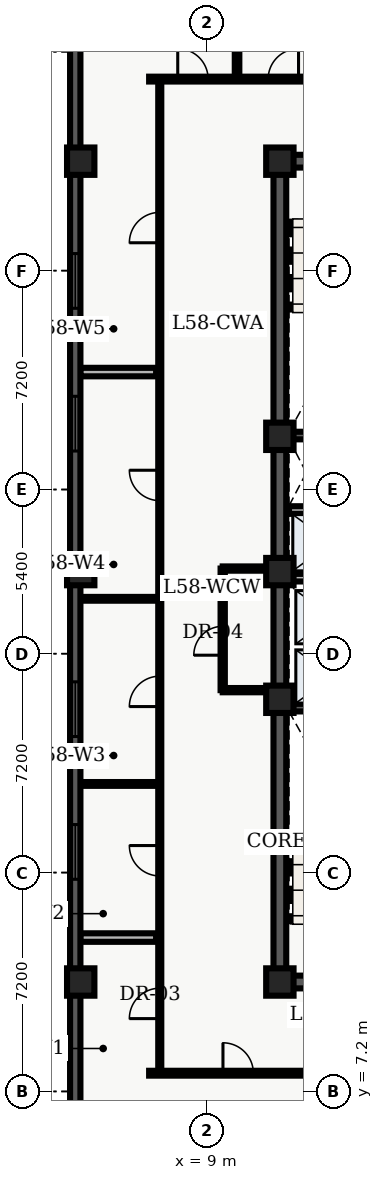
"""IFC4 building model, lengths in metres.
Left out: names, types, materials, properties, quantities, classifications, styles, units other than length and angle.
Written with IfcOpenShell. Run it as: python <this file> out.ifc"""

import sys

from ifc_helpers import new_model, entity, si_unit, converted_unit, direction, frame, origin_with_axes, origin_2d_with_axis, place, context, subcontext, project, spatial, polyline, rectangle, outline, extrude, element, fill, save


model = new_model("IFC4")
c1 = context("Model", 3, precision=1e-05, world=origin_with_axes(), true_north=direction((0.0, 1.0)))
c2 = subcontext(c1, "Body", "Model", "MODEL_VIEW")
j1 = project(units=[si_unit("LENGTHUNIT", "METRE"), converted_unit("PLANEANGLEUNIT", "DEGREE", entity("IfcPlaneAngleMeasure", 0.017), si_unit("PLANEANGLEUNIT", "RADIAN"), dimensions=[0, 0, 0, 0, 0, 0, 0])], contexts=[c1])
p1 = place(None, origin_with_axes())
s1 = spatial("IfcSite", under=j1, at=p1, CompositionType="ELEMENT")
p2 = place(p1, origin_with_axes())
s2 = spatial("IfcBuilding", under=s1, at=p2, CompositionType="ELEMENT")
p3 = place(p2, frame((0.0, 0.0, 236.4), z_axis=(0.0, 0.0, 1.0), x_axis=(1.0, 0.0, 0.0)))
s3 = spatial("IfcBuildingStorey", under=s2, at=p3, CompositionType="ELEMENT", Elevation=236.4)
p4 = place(p3, frame((11.4, 10.8, 0.0), z_axis=(0.0, 0.0, 1.0), x_axis=(0.0, 1.0, 0.0)))
e1 = element("IfcWall", 1, at=p4, inside=s3, PredefinedType="SHEAR", context=c2, shape_type="SweptSolid", body=[
    extrude(outline(polyline([(0.0, -0.21), (27.0, -0.21), (27.0, 0.21), (0.0, 0.21), (0.0, -0.21)])), origin_with_axes(), (0.0, 0.0, 1.0), 3.66),
])
p5 = place(p3, frame((11.4, 10.8, 0.0), z_axis=(0.0, 0.0, 1.0), x_axis=(1.0, 0.0, 0.0)))
e2 = element("IfcWall", 2, at=p5, inside=s3, PredefinedType="SHEAR", context=c2, shape_type="SweptSolid", body=[
    extrude(outline(polyline([(0.0, -0.21), (7.2, -0.21), (7.2, 0.21), (0.0, 0.21), (0.0, -0.21)])), origin_with_axes(), (0.0, 0.0, 1.0), 3.66),
])
p6 = place(p5, frame((2.625, 0.0, 0.0), z_axis=(0.0, 0.0, 1.0), x_axis=(1.0, 0.0, 0.0)))
e3 = element("IfcOpeningElement", 3, at=p6, cuts=e2, PredefinedType="OPENING", context=c2, shape_type="SweptSolid", body=[
    extrude(rectangle(XDim=1.05, YDim=0.44, at=origin_2d_with_axis()), origin_with_axes(), (0.0, 0.0, 1.0), 2.15),
])
p7 = place(p3, frame((11.4, 37.8, 0.0), z_axis=(0.0, 0.0, 1.0), x_axis=(1.0, 0.0, 0.0)))
e4 = element("IfcWall", 4, at=p7, inside=s3, PredefinedType="SHEAR", context=c2, shape_type="SweptSolid", body=[
    extrude(outline(polyline([(0.0, -0.21), (7.2, -0.21), (7.2, 0.21), (0.0, 0.21), (0.0, -0.21)])), origin_with_axes(), (0.0, 0.0, 1.0), 3.66),
])
p8 = place(p7, frame((2.625, 0.0, 0.0), z_axis=(0.0, 0.0, 1.0), x_axis=(1.0, 0.0, 0.0)))
e5 = element("IfcOpeningElement", 5, at=p8, cuts=e4, PredefinedType="OPENING", context=c2, shape_type="SweptSolid", body=[
    extrude(rectangle(XDim=1.05, YDim=0.44, at=origin_2d_with_axis()), origin_with_axes(), (0.0, 0.0, 1.0), 2.15),
])
for number, where, z_axis, x_axis in (
    (6, (11.61, 19.825, 0.0), (0.0, 0.0, 1.0), (1.0, 0.0, 0.0)),
    (7, (11.61, 28.775, 0.0), (0.0, 0.0, 1.0), (1.0, 0.0, 0.0)),
):
    element("IfcWall", number, at=place(p3, frame(where, z_axis=z_axis, x_axis=x_axis)), inside=s3, PredefinedType="SHEAR", context=c2, shape_type="SweptSolid", body=[
        extrude(outline(polyline([(0.0, -0.125), (6.78, -0.125), (6.78, 0.125), (0.0, 0.125), (0.0, -0.125)])), origin_with_axes(), (0.0, 0.0, 1.0), 3.66),
    ])
p9 = place(p3, frame((11.7, 24.1, 0.0), z_axis=(0.0, 0.0, 1.0), x_axis=(1.0, 0.0, 0.0)))
e8 = element("IfcWall", 8, at=p9, inside=s3, PredefinedType="SOLIDWALL", context=c2, shape_type="SweptSolid", body=[
    extrude(outline(polyline([(0.0, -0.125), (6.6, -0.125), (6.6, 0.125), (0.0, 0.125), (0.0, -0.125)])), origin_with_axes(), (0.0, 0.0, 1.0), 2.7),
])
p10 = place(p9, frame((3.6, 0.0, 0.0), z_axis=(0.0, 0.0, 1.0), x_axis=(1.0, 0.0, 0.0)))
e9 = element("IfcOpeningElement", 9, at=p10, cuts=e8, PredefinedType="OPENING", context=c2, shape_type="SweptSolid", body=[
    extrude(rectangle(XDim=0.9, YDim=0.27, at=origin_2d_with_axis()), origin_with_axes(), (0.0, 0.0, 1.0), 2.15),
])
p11 = place(p9, frame((5.65, 0.0, 0.0), z_axis=(0.0, 0.0, 1.0), x_axis=(1.0, 0.0, 0.0)))
e10 = element("IfcOpeningElement", 10, at=p11, cuts=e8, PredefinedType="OPENING", context=c2, shape_type="SweptSolid", body=[
    extrude(rectangle(XDim=0.9, YDim=0.27, at=origin_2d_with_axis()), origin_with_axes(), (0.0, 0.0, 1.0), 2.15),
])
p12 = place(p3, frame((11.7, 26.325, 0.0), z_axis=(0.0, 0.0, 1.0), x_axis=(1.0, 0.0, 0.0)))
e11 = element("IfcWall", 11, at=p12, inside=s3, PredefinedType="SOLIDWALL", context=c2, shape_type="SweptSolid", body=[
    extrude(outline(polyline([(0.0, -0.125), (6.6, -0.125), (6.6, 0.125), (0.0, 0.125), (0.0, -0.125)])), origin_with_axes(), (0.0, 0.0, 1.0), 2.7),
])
p13 = place(p12, frame((3.5, 0.0, 0.0), z_axis=(0.0, 0.0, 1.0), x_axis=(1.0, 0.0, 0.0)))
e12 = element("IfcOpeningElement", 12, at=p13, cuts=e11, PredefinedType="OPENING", context=c2, shape_type="SweptSolid", body=[
    extrude(rectangle(XDim=0.9, YDim=0.27, at=origin_2d_with_axis()), origin_with_axes(), (0.0, 0.0, 1.0), 2.15),
])
for number, where, z_axis, x_axis in (
    (13, (11.4, 10.8, 0.0), (0.0, 0.0, 1.0), (1.0, 0.0, 0.0)),
    (14, (11.4, 20.1, 0.0), (0.0, 0.0, 1.0), (1.0, 0.0, 0.0)),
    (15, (11.4, 24.3, 0.0), (0.0, 0.0, 1.0), (1.0, 0.0, 0.0)),
    (16, (11.4, 28.75, 0.0), (0.0, 0.0, 1.0), (1.0, 0.0, 0.0)),
    (17, (11.4, 37.8, 0.0), (0.0, 0.0, 1.0), (1.0, 0.0, 0.0)),
    (18, (4.85, 10.8, 0.0), (0.0, 0.0, 1.0), (1.0, 0.0, 0.0)),
    (19, (4.85, 24.3, 0.0), (0.0, 0.0, 1.0), (1.0, 0.0, 0.0)),
    (20, (4.85, 37.8, 0.0), (0.0, 0.0, 1.0), (1.0, 0.0, 0.0)),
):
    element("IfcColumn", number, at=place(p3, frame(where, z_axis=z_axis, x_axis=x_axis)), inside=s3, PredefinedType="COLUMN", context=c2, shape_type="SweptSolid", body=[
        extrude(rectangle(XDim=0.9, YDim=0.9, at=origin_2d_with_axis()), origin_with_axes(), (0.0, 0.0, 1.0), 3.9),
    ])
p14 = place(p3, frame((9.52, 20.4, 0.0), z_axis=(0.0, 0.0, 1.0), x_axis=(0.0, 1.0, 0.0)))
e21 = element("IfcWall", 21, at=p14, inside=s3, PredefinedType="PARTITIONING", context=c2, shape_type="SweptSolid", body=[
    extrude(outline(polyline([(0.0, -0.07), (4.0, -0.07), (4.0, 0.07), (0.0, 0.07), (0.0, -0.07)])), origin_with_axes(), (0.0, 0.0, 1.0), 2.7),
])
p15 = place(p14, frame((1.625, 0.0, 0.0), z_axis=(0.0, 0.0, 1.0), x_axis=(1.0, 0.0, 0.0)))
e22 = element("IfcOpeningElement", 22, at=p15, cuts=e21, PredefinedType="OPENING", context=c2, shape_type="SweptSolid", body=[
    extrude(rectangle(XDim=0.95, YDim=0.16, at=origin_2d_with_axis()), origin_with_axes(), (0.0, 0.0, 1.0), 2.15),
])
for number, where, z_axis, x_axis in (
    (23, (9.52, 20.4, 0.0), (0.0, 0.0, 1.0), (1.0, 0.0, 0.0)),
    (24, (9.52, 24.4, 0.0), (0.0, 0.0, 1.0), (1.0, 0.0, 0.0)),
):
    element("IfcWall", number, at=place(p3, frame(where, z_axis=z_axis, x_axis=x_axis)), inside=s3, PredefinedType="PARTITIONING", context=c2, shape_type="SweptSolid", body=[
        extrude(outline(polyline([(0.0, -0.07), (1.58, -0.07), (1.58, 0.07), (0.0, 0.07), (0.0, -0.07)])), origin_with_axes(), (0.0, 0.0, 1.0), 2.7),
    ])
p16 = place(p3, frame((7.1, 7.8, 0.0), z_axis=(0.0, 0.0, 1.0), x_axis=(1.0, 0.0, 0.0)))
e25 = element("IfcWall", 25, at=p16, inside=s3, PredefinedType="PARTITIONING", context=c2, shape_type="SweptSolid", body=[
    extrude(outline(polyline([(0.0, -0.08), (13.2, -0.08), (13.2, 0.08), (0.0, 0.08), (0.0, -0.08)])), origin_with_axes(), (0.0, 0.0, 1.0), 2.7),
])
p17 = place(p16, frame((2.929, 0.0, 0.0), z_axis=(0.0, 0.0, 1.0), x_axis=(1.0, 0.0, 0.0)))
e26 = element("IfcOpeningElement", 26, at=p17, cuts=e25, PredefinedType="OPENING", context=c2, shape_type="SweptSolid", body=[
    extrude(rectangle(XDim=1.0, YDim=0.18, at=origin_2d_with_axis()), origin_with_axes(), (0.0, 0.0, 1.0), 2.15),
])
p18 = place(p16, frame((7.56, 0.0, 0.0), z_axis=(0.0, 0.0, 1.0), x_axis=(1.0, 0.0, 0.0)))
e27 = element("IfcOpeningElement", 27, at=p18, cuts=e25, PredefinedType="OPENING", context=c2, shape_type="SweptSolid", body=[
    extrude(rectangle(XDim=1.0, YDim=0.18, at=origin_2d_with_axis()), origin_with_axes(), (0.0, 0.0, 1.0), 2.15),
])
p19 = place(p16, frame((11.201, 0.0, 0.0), z_axis=(0.0, 0.0, 1.0), x_axis=(1.0, 0.0, 0.0)))
e28 = element("IfcOpeningElement", 28, at=p19, cuts=e25, PredefinedType="OPENING", context=c2, shape_type="SweptSolid", body=[
    extrude(rectangle(XDim=1.0, YDim=0.18, at=origin_2d_with_axis()), origin_with_axes(), (0.0, 0.0, 1.0), 2.15),
])
p20 = place(p3, frame((7.1, 40.5, 0.0), z_axis=(0.0, 0.0, 1.0), x_axis=(1.0, 0.0, 0.0)))
e29 = element("IfcWall", 29, at=p20, inside=s3, PredefinedType="PARTITIONING", context=c2, shape_type="SweptSolid", body=[
    extrude(outline(polyline([(0.0, -0.08), (24.965, -0.08), (24.965, 0.08), (0.0, 0.08), (0.0, -0.08)])), origin_with_axes(), (0.0, 0.0, 1.0), 2.7),
])
p21 = place(p20, frame((1.441, 0.0, 0.0), z_axis=(0.0, 0.0, 1.0), x_axis=(1.0, 0.0, 0.0)))
e30 = element("IfcOpeningElement", 30, at=p21, cuts=e29, PredefinedType="OPENING", context=c2, shape_type="SweptSolid", body=[
    extrude(rectangle(XDim=1.0, YDim=0.18, at=origin_2d_with_axis()), origin_with_axes(), (0.0, 0.0, 1.0), 2.15),
])
p22 = place(p20, frame((4.415, 0.0, 0.0), z_axis=(0.0, 0.0, 1.0), x_axis=(1.0, 0.0, 0.0)))
e31 = element("IfcOpeningElement", 31, at=p22, cuts=e29, PredefinedType="OPENING", context=c2, shape_type="SweptSolid", body=[
    extrude(rectangle(XDim=1.0, YDim=0.18, at=origin_2d_with_axis()), origin_with_axes(), (0.0, 0.0, 1.0), 2.15),
])
p23 = place(p20, frame((7.614, 0.0, 0.0), z_axis=(0.0, 0.0, 1.0), x_axis=(1.0, 0.0, 0.0)))
e32 = element("IfcOpeningElement", 32, at=p23, cuts=e29, PredefinedType="OPENING", context=c2, shape_type="SweptSolid", body=[
    extrude(rectangle(XDim=1.0, YDim=0.18, at=origin_2d_with_axis()), origin_with_axes(), (0.0, 0.0, 1.0), 2.15),
])
p24 = place(p20, frame((11.156, 0.0, 0.0), z_axis=(0.0, 0.0, 1.0), x_axis=(1.0, 0.0, 0.0)))
e33 = element("IfcOpeningElement", 33, at=p24, cuts=e29, PredefinedType="OPENING", context=c2, shape_type="SweptSolid", body=[
    extrude(rectangle(XDim=1.0, YDim=0.18, at=origin_2d_with_axis()), origin_with_axes(), (0.0, 0.0, 1.0), 2.15),
])
p25 = place(p3, frame((7.45, 7.8, 0.0), z_axis=(0.0, 0.0, 1.0), x_axis=(0.0, 1.0, 0.0)))
e34 = element("IfcWall", 34, at=p25, inside=s3, PredefinedType="PARTITIONING", context=c2, shape_type="SweptSolid", body=[
    extrude(outline(polyline([(0.0, -0.05), (32.7, -0.05), (32.7, 0.05), (0.0, 0.05), (0.0, -0.05)])), origin_with_axes(), (0.0, 0.0, 1.0), 2.7),
])
p26 = place(p25, frame((2.296, 0.0, 0.0), z_axis=(0.0, 0.0, 1.0), x_axis=(1.0, 0.0, 0.0)))
e35 = element("IfcOpeningElement", 35, at=p26, cuts=e34, PredefinedType="OPENING", context=c2, shape_type="SweptSolid", body=[
    extrude(rectangle(XDim=1.0, YDim=0.12, at=origin_2d_with_axis()), origin_with_axes(), (0.0, 0.0, 1.0), 2.15),
])
p27 = place(p25, frame((6.989, 0.0, 0.0), z_axis=(0.0, 0.0, 1.0), x_axis=(1.0, 0.0, 0.0)))
e36 = element("IfcOpeningElement", 36, at=p27, cuts=e34, PredefinedType="OPENING", context=c2, shape_type="SweptSolid", body=[
    extrude(rectangle(XDim=1.0, YDim=0.12, at=origin_2d_with_axis()), origin_with_axes(), (0.0, 0.0, 1.0), 2.15),
])
p28 = place(p25, frame((12.56, 0.0, 0.0), z_axis=(0.0, 0.0, 1.0), x_axis=(1.0, 0.0, 0.0)))
e37 = element("IfcOpeningElement", 37, at=p28, cuts=e34, PredefinedType="OPENING", context=c2, shape_type="SweptSolid", body=[
    extrude(rectangle(XDim=1.0, YDim=0.12, at=origin_2d_with_axis()), origin_with_axes(), (0.0, 0.0, 1.0), 2.15),
])
p29 = place(p25, frame((19.334, 0.0, 0.0), z_axis=(0.0, 0.0, 1.0), x_axis=(1.0, 0.0, 0.0)))
e38 = element("IfcOpeningElement", 38, at=p29, cuts=e34, PredefinedType="OPENING", context=c2, shape_type="SweptSolid", body=[
    extrude(rectangle(XDim=1.0, YDim=0.12, at=origin_2d_with_axis()), origin_with_axes(), (0.0, 0.0, 1.0), 2.15),
])
p30 = place(p25, frame((27.817, 0.0, 0.0), z_axis=(0.0, 0.0, 1.0), x_axis=(1.0, 0.0, 0.0)))
e39 = element("IfcOpeningElement", 39, at=p30, cuts=e34, PredefinedType="OPENING", context=c2, shape_type="SweptSolid", body=[
    extrude(rectangle(XDim=1.0, YDim=0.12, at=origin_2d_with_axis()), origin_with_axes(), (0.0, 0.0, 1.0), 2.15),
])
p31 = place(p3, frame((4.835, 12.262, 0.0), z_axis=(0.0, 0.0, 1.0), x_axis=(1.0, 0.0, 0.0)))
e40 = element("IfcWall", 40, at=p31, inside=s3, PredefinedType="PARTITIONING", context=c2, shape_type="SweptSolid", body=[
    extrude(outline(polyline([(0.0, -0.14), (2.495, -0.14), (2.495, 0.14), (0.0, 0.14), (0.0, -0.14)])), origin_with_axes(), (0.0, 0.0, 1.0), 2.7),
])
for number, where, z_axis, x_axis in (
    (41, (4.835, 17.315, 0.0), (0.0, 0.0, 1.0), (1.0, 0.0, 0.0)),
    (42, (4.835, 23.405, 0.0), (0.0, 0.0, 1.0), (1.0, 0.0, 0.0)),
):
    element("IfcWall", number, at=place(p3, frame(where, z_axis=z_axis, x_axis=x_axis)), inside=s3, PredefinedType="PARTITIONING", context=c2, shape_type="SweptSolid", body=[
        extrude(outline(polyline([(0.0, -0.062), (2.495, -0.062), (2.495, 0.062), (0.0, 0.062), (0.0, -0.062)])), origin_with_axes(), (0.0, 0.0, 1.0), 2.7),
    ])
p32 = place(p3, frame((4.835, 30.863, 0.0), z_axis=(0.0, 0.0, 1.0), x_axis=(1.0, 0.0, 0.0)))
e43 = element("IfcWall", 43, at=p32, inside=s3, PredefinedType="PARTITIONING", context=c2, shape_type="SweptSolid", body=[
    extrude(outline(polyline([(0.0, -0.14), (2.495, -0.14), (2.495, 0.14), (0.0, 0.14), (0.0, -0.14)])), origin_with_axes(), (0.0, 0.0, 1.0), 2.7),
])
p33 = place(p3, frame((9.992, 40.6, 0.0), z_axis=(0.0, 0.0, 1.0), x_axis=(0.0, 1.0, 0.0)))
e44 = element("IfcWall", 44, at=p33, inside=s3, PredefinedType="PARTITIONING", context=c2, shape_type="SweptSolid", body=[
    extrude(outline(polyline([(0.0, -0.075), (7.665, -0.075), (7.665, 0.075), (0.0, 0.075), (0.0, -0.075)])), origin_with_axes(), (0.0, 0.0, 1.0), 2.7),
])
p34 = place(p3, frame((4.67, 2.74, 0.0), z_axis=(0.0, 0.0, 1.0), x_axis=(0.0, 1.0, 0.0)))
e45 = element("IfcWall", 45, at=p34, inside=s3, PredefinedType="SOLIDWALL", context=c2, shape_type="SweptSolid", body=[
    extrude(outline(polyline([(0.0, -0.17), (43.46, -0.17), (43.46, 0.17), (0.0, 0.17), (0.0, -0.17)])), origin_with_axes(), (0.0, 0.0, 1.0), 3.66),
])
p35 = place(p34, frame((2.948, 0.0, 0.45), z_axis=(0.0, 0.0, 1.0), x_axis=(1.0, 0.0, 0.0)))
e46 = element("IfcOpeningElement", 46, at=p35, cuts=e45, PredefinedType="OPENING", context=c2, shape_type="SweptSolid", body=[
    extrude(rectangle(XDim=1.8, YDim=0.36, at=origin_2d_with_axis()), origin_with_axes(), (0.0, 0.0, 1.0), 2.1),
])
p36 = place(p34, frame((12.339, 0.0, 0.45), z_axis=(0.0, 0.0, 1.0), x_axis=(1.0, 0.0, 0.0)))
e47 = element("IfcOpeningElement", 47, at=p36, cuts=e45, PredefinedType="OPENING", context=c2, shape_type="SweptSolid", body=[
    extrude(rectangle(XDim=1.8, YDim=0.36, at=origin_2d_with_axis()), origin_with_axes(), (0.0, 0.0, 1.0), 2.1),
])
p37 = place(p34, frame((17.034, 0.0, 0.45), z_axis=(0.0, 0.0, 1.0), x_axis=(1.0, 0.0, 0.0)))
e48 = element("IfcOpeningElement", 48, at=p37, cuts=e45, PredefinedType="OPENING", context=c2, shape_type="SweptSolid", body=[
    extrude(rectangle(XDim=1.8, YDim=0.36, at=origin_2d_with_axis()), origin_with_axes(), (0.0, 0.0, 1.0), 2.1),
])
p38 = place(p34, frame((26.426, 0.0, 0.45), z_axis=(0.0, 0.0, 1.0), x_axis=(1.0, 0.0, 0.0)))
e49 = element("IfcOpeningElement", 49, at=p38, cuts=e45, PredefinedType="OPENING", context=c2, shape_type="SweptSolid", body=[
    extrude(rectangle(XDim=1.8, YDim=0.36, at=origin_2d_with_axis()), origin_with_axes(), (0.0, 0.0, 1.0), 2.1),
])
p39 = place(p34, frame((31.121, 0.0, 0.45), z_axis=(0.0, 0.0, 1.0), x_axis=(1.0, 0.0, 0.0)))
e50 = element("IfcOpeningElement", 50, at=p39, cuts=e45, PredefinedType="OPENING", context=c2, shape_type="SweptSolid", body=[
    extrude(rectangle(XDim=1.8, YDim=0.36, at=origin_2d_with_axis()), origin_with_axes(), (0.0, 0.0, 1.0), 2.1),
])
p40 = place(p34, frame((40.062, 0.0, 0.45), z_axis=(0.0, 0.0, 1.0), x_axis=(1.0, 0.0, 0.0)))
e51 = element("IfcOpeningElement", 51, at=p40, cuts=e45, PredefinedType="OPENING", context=c2, shape_type="SweptSolid", body=[
    extrude(rectangle(XDim=1.8, YDim=0.36, at=origin_2d_with_axis()), origin_with_axes(), (0.0, 0.0, 1.0), 2.1),
])
p41 = place(p14, frame((1.625, 0.0, 0.0), z_axis=(0.0, 0.0, 1.0), x_axis=(1.0, 0.0, 0.0)))
e52 = element("IfcDoor", 52, at=p41, inside=s3, OperationType="SINGLE_SWING_LEFT", PredefinedType="DOOR", context=c2, shape_type="SweptSolid", body=[
    extrude(rectangle(XDim=0.95, YDim=0.084, at=origin_2d_with_axis()), origin_with_axes(), (0.0, 0.0, 1.0), 2.15),
])
fill(e22, e52)
p42 = place(p25, frame((2.296, 0.0, 0.0), z_axis=(0.0, 0.0, 1.0), x_axis=(1.0, 0.0, 0.0)))
e53 = element("IfcDoor", 53, at=p42, inside=s3, OperationType="SINGLE_SWING_LEFT", PredefinedType="DOOR", context=c2, shape_type="SweptSolid", body=[
    extrude(rectangle(XDim=1.0, YDim=0.06, at=origin_2d_with_axis()), origin_with_axes(), (0.0, 0.0, 1.0), 2.15),
])
fill(e35, e53)
p43 = place(p25, frame((6.989, 0.0, 0.0), z_axis=(0.0, 0.0, 1.0), x_axis=(1.0, 0.0, 0.0)))
e54 = element("IfcDoor", 54, at=p43, inside=s3, OperationType="SINGLE_SWING_RIGHT", PredefinedType="DOOR", context=c2, shape_type="SweptSolid", body=[
    extrude(rectangle(XDim=1.0, YDim=0.06, at=origin_2d_with_axis()), origin_with_axes(), (0.0, 0.0, 1.0), 2.15),
])
fill(e36, e54)
p44 = place(p25, frame((12.56, 0.0, 0.0), z_axis=(0.0, 0.0, 1.0), x_axis=(1.0, 0.0, 0.0)))
e55 = element("IfcDoor", 55, at=p44, inside=s3, OperationType="SINGLE_SWING_LEFT", PredefinedType="DOOR", context=c2, shape_type="SweptSolid", body=[
    extrude(rectangle(XDim=1.0, YDim=0.06, at=origin_2d_with_axis()), origin_with_axes(), (0.0, 0.0, 1.0), 2.15),
])
fill(e37, e55)
p45 = place(p25, frame((19.334, 0.0, 0.0), z_axis=(0.0, 0.0, 1.0), x_axis=(1.0, 0.0, 0.0)))
e56 = element("IfcDoor", 56, at=p45, inside=s3, OperationType="SINGLE_SWING_RIGHT", PredefinedType="DOOR", context=c2, shape_type="SweptSolid", body=[
    extrude(rectangle(XDim=1.0, YDim=0.06, at=origin_2d_with_axis()), origin_with_axes(), (0.0, 0.0, 1.0), 2.15),
])
fill(e38, e56)
p46 = place(p25, frame((27.817, 0.0, 0.0), z_axis=(0.0, 0.0, 1.0), x_axis=(1.0, 0.0, 0.0)))
e57 = element("IfcDoor", 57, at=p46, inside=s3, OperationType="SINGLE_SWING_LEFT", PredefinedType="DOOR", context=c2, shape_type="SweptSolid", body=[
    extrude(rectangle(XDim=1.0, YDim=0.06, at=origin_2d_with_axis()), origin_with_axes(), (0.0, 0.0, 1.0), 2.15),
])
fill(e39, e57)
p47 = place(p16, frame((2.929, 0.0, 0.0), z_axis=(0.0, 0.0, 1.0), x_axis=(1.0, 0.0, 0.0)))
e58 = element("IfcDoor", 58, at=p47, inside=s3, OperationType="SINGLE_SWING_LEFT", PredefinedType="DOOR", context=c2, shape_type="SweptSolid", body=[
    extrude(rectangle(XDim=1.0, YDim=0.09, at=origin_2d_with_axis()), origin_with_axes(), (0.0, 0.0, 1.0), 2.15),
])
fill(e26, e58)
p48 = place(p20, frame((1.441, 0.0, 0.0), z_axis=(0.0, 0.0, 1.0), x_axis=(1.0, 0.0, 0.0)))
e59 = element("IfcDoor", 59, at=p48, inside=s3, OperationType="SINGLE_SWING_LEFT", PredefinedType="DOOR", context=c2, shape_type="SweptSolid", body=[
    extrude(rectangle(XDim=1.0, YDim=0.09, at=origin_2d_with_axis()), origin_with_axes(), (0.0, 0.0, 1.0), 2.15),
])
fill(e30, e59)
p49 = place(p20, frame((4.415, 0.0, 0.0), z_axis=(0.0, 0.0, 1.0), x_axis=(1.0, 0.0, 0.0)))
e60 = element("IfcDoor", 60, at=p49, inside=s3, OperationType="SINGLE_SWING_RIGHT", PredefinedType="DOOR", context=c2, shape_type="SweptSolid", body=[
    extrude(rectangle(XDim=1.0, YDim=0.09, at=origin_2d_with_axis()), origin_with_axes(), (0.0, 0.0, 1.0), 2.15),
])
fill(e31, e60)
p50 = place(p34, frame((12.339, 0.0, 0.45), z_axis=(0.0, 0.0, 1.0), x_axis=(1.0, 0.0, 0.0)))
e61 = element("IfcWindow", 61, at=p50, inside=s3, PredefinedType="WINDOW", context=c2, shape_type="SweptSolid", body=[
    extrude(rectangle(XDim=1.8, YDim=0.09, at=origin_2d_with_axis()), origin_with_axes(), (0.0, 0.0, 1.0), 2.1),
])
fill(e47, e61)
p51 = place(p34, frame((17.034, 0.0, 0.45), z_axis=(0.0, 0.0, 1.0), x_axis=(1.0, 0.0, 0.0)))
e62 = element("IfcWindow", 62, at=p51, inside=s3, PredefinedType="WINDOW", context=c2, shape_type="SweptSolid", body=[
    extrude(rectangle(XDim=1.8, YDim=0.09, at=origin_2d_with_axis()), origin_with_axes(), (0.0, 0.0, 1.0), 2.1),
])
fill(e48, e62)
p52 = place(p34, frame((26.426, 0.0, 0.45), z_axis=(0.0, 0.0, 1.0), x_axis=(1.0, 0.0, 0.0)))
e63 = element("IfcWindow", 63, at=p52, inside=s3, PredefinedType="WINDOW", context=c2, shape_type="SweptSolid", body=[
    extrude(rectangle(XDim=1.8, YDim=0.09, at=origin_2d_with_axis()), origin_with_axes(), (0.0, 0.0, 1.0), 2.1),
])
fill(e49, e63)
p53 = place(p34, frame((31.121, 0.0, 0.45), z_axis=(0.0, 0.0, 1.0), x_axis=(1.0, 0.0, 0.0)))
e64 = element("IfcWindow", 64, at=p53, inside=s3, PredefinedType="WINDOW", context=c2, shape_type="SweptSolid", body=[
    extrude(rectangle(XDim=1.8, YDim=0.09, at=origin_2d_with_axis()), origin_with_axes(), (0.0, 0.0, 1.0), 2.1),
])
fill(e50, e64)
save(model, sys.argv[1])
